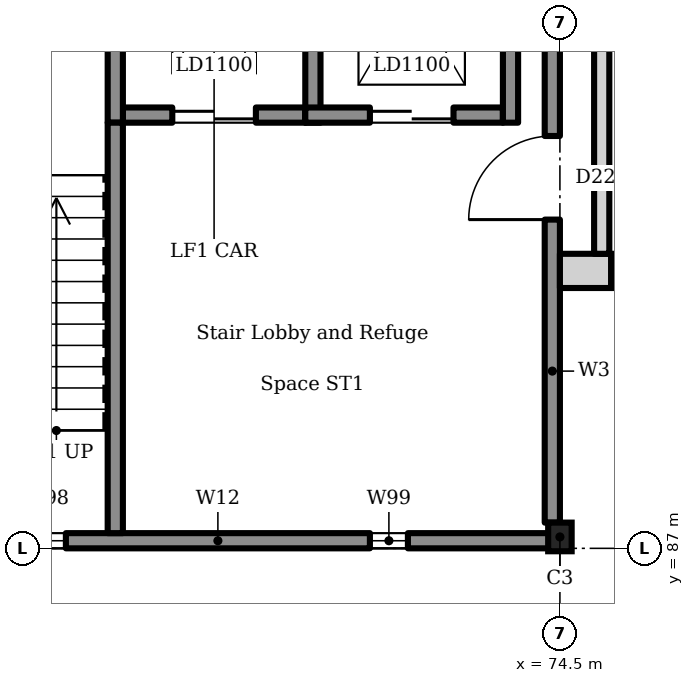
"""IFC4 building model, lengths in metres.
Left out: names, types, materials, properties, quantities, classifications, styles, units other than length and angle.
Written with IfcOpenShell. Run it as: python <this file> out.ifc"""

import sys

from ifc_helpers import new_model, si_unit, direction, frame, frame_2d, origin, origin_2d, place, context, subcontext, project, spatial, rectangle, i_section, extrude, element, fill, save


model = new_model("IFC4")
c1 = context("Model", 3, precision=1e-05, world=origin(), true_north=direction((0.0, 1.0)))
c2 = subcontext(c1, "Body", "Model", "MODEL_VIEW")
j1 = project(units=[si_unit("LENGTHUNIT", "METRE"), si_unit("PLANEANGLEUNIT", "RADIAN")], contexts=[c1])
p1 = place(None, origin())
s1 = spatial("IfcSite", under=j1, at=p1, CompositionType="ELEMENT")
p2 = place(p1, origin())
s2 = spatial("IfcBuilding", under=s1, at=p2, CompositionType="ELEMENT")
p3 = place(p2, frame((0.0, 0.0, 5.4)))
s3 = spatial("IfcBuildingStorey", under=s2, at=p3, CompositionType="ELEMENT", Elevation=5.4)
p4 = place(p3, frame((68.75, 92.7, 0.0), z_axis=(0.0, 0.0, 1.0), x_axis=(1.0, 0.0, 0.0)))
e1 = element("IfcWall", 1, at=p4, inside=s3, PredefinedType="SOLIDWALL", context=c2, shape_type="SweptSolid", body=[
    extrude(rectangle(XDim=2.4, YDim=0.2, at=frame_2d((1.2, 0.0))), origin(), (0.0, 0.0, 1.0), 4.5),
])
p5 = place(p4, frame((0.65, 0.0, 0.0)))
e2 = element("IfcOpeningElement", 2, at=p5, cuts=e1, PredefinedType="OPENING", context=c2, shape_type="SweptSolid", body=[
    extrude(rectangle(XDim=1.1, YDim=2.1, at=frame_2d((0.55, 1.05))), frame((0.0, 0.11, 0.0), z_axis=(0.0, -1.0, 0.0), x_axis=(1.0, 0.0, 0.0)), (0.0, 0.0, 1.0), 0.22),
])
for number, where, z_axis, x_axis in (
    (3, (68.65, 92.6, 0.0), (0.0, 0.0, 1.0), (0.0, 1.0, 0.0)),
    (4, (71.25, 92.6, 0.0), (0.0, 0.0, 1.0), (0.0, 1.0, 0.0)),
):
    element("IfcWall", number, at=place(p3, frame(where, z_axis=z_axis, x_axis=x_axis)), inside=s3, PredefinedType="SOLIDWALL", context=c2, shape_type="SweptSolid", body=[
        extrude(rectangle(XDim=3.4, YDim=0.2, at=frame_2d((1.7, 0.0))), origin(), (0.0, 0.0, 1.0), 4.5),
    ])
p6 = place(p3, frame((71.15, 92.7, 0.0), z_axis=(0.0, 0.0, 1.0), x_axis=(1.0, 0.0, 0.0)))
e5 = element("IfcWall", 5, at=p6, inside=s3, PredefinedType="SOLIDWALL", context=c2, shape_type="SweptSolid", body=[
    extrude(rectangle(XDim=2.6, YDim=0.2, at=frame_2d((1.3, 0.0))), origin(), (0.0, 0.0, 1.0), 4.5),
])
p7 = place(p6, frame((0.85, 0.0, 0.0)))
e6 = element("IfcOpeningElement", 6, at=p7, cuts=e5, PredefinedType="OPENING", context=c2, shape_type="SweptSolid", body=[
    extrude(rectangle(XDim=1.1, YDim=2.1, at=frame_2d((0.55, 1.05))), frame((0.0, 0.11, 0.0), z_axis=(0.0, -1.0, 0.0), x_axis=(1.0, 0.0, 0.0)), (0.0, 0.0, 1.0), 0.22),
])
p8 = place(p3, frame((73.85, 92.6, 0.0), z_axis=(0.0, 0.0, 1.0), x_axis=(0.0, 1.0, 0.0)))
e7 = element("IfcWall", 7, at=p8, inside=s3, PredefinedType="SOLIDWALL", context=c2, shape_type="SweptSolid", body=[
    extrude(rectangle(XDim=3.4, YDim=0.2, at=frame_2d((1.7, 0.0))), origin(), (0.0, 0.0, 1.0), 4.5),
])
p9 = place(p3, frame((74.5, 87.15, 0.0), z_axis=(0.0, 0.0, 1.0), x_axis=(1.0, 0.0, 0.0)))
e8 = element("IfcColumn", 8, at=p9, inside=s3, PredefinedType="COLUMN", context=c2, shape_type="SweptSolid", body=[
    extrude(i_section(OverallWidth=0.309, OverallDepth=0.377, WebThickness=0.021, FlangeThickness=0.04, FilletRadius=0.027, at=origin_2d()), origin(), (0.0, 0.0, 1.0), 4.5),
])
p10 = place(p3, frame((74.5, 90.65, 0.0), z_axis=(0.0, 0.0, 1.0), x_axis=(1.0, 0.0, 0.0)))
e9 = element("IfcWall", 9, at=p10, inside=s3, PredefinedType="SOLIDWALL", context=c2, shape_type="SweptSolid", body=[
    extrude(rectangle(XDim=0.675, YDim=0.45, at=frame_2d((0.337, 0.0))), origin(), (0.0, 0.0, 1.0), 2.3),
])
p11 = place(p3, frame((75.175, 90.65, 0.0), z_axis=(0.0, 0.0, 1.0), x_axis=(1.0, 0.0, 0.0)))
e10 = element("IfcWall", 10, at=p11, inside=s3, PredefinedType="SOLIDWALL", context=c2, shape_type="SweptSolid", body=[
    extrude(rectangle(XDim=8.0, YDim=0.45, at=frame_2d((4.0, 0.0))), origin(), (0.0, 0.0, 1.0), 3.97),
])
p12 = place(p11, frame((1.9, 0.0, 0.8)))
e11 = element("IfcOpeningElement", 11, at=p12, cuts=e10, PredefinedType="OPENING", context=c2, shape_type="SweptSolid", body=[
    extrude(rectangle(XDim=1.2, YDim=1.4, at=frame_2d((0.6, 0.7))), frame((0.0, 0.235, 0.0), z_axis=(0.0, -1.0, 0.0), x_axis=(1.0, 0.0, 0.0)), (0.0, 0.0, 1.0), 0.47),
])
p13 = place(p11, frame((4.9, 0.0, 0.8)))
e12 = element("IfcOpeningElement", 12, at=p13, cuts=e10, PredefinedType="OPENING", context=c2, shape_type="SweptSolid", body=[
    extrude(rectangle(XDim=1.2, YDim=1.4, at=frame_2d((0.6, 0.7))), frame((0.0, 0.235, 0.0), z_axis=(0.0, -1.0, 0.0), x_axis=(1.0, 0.0, 0.0)), (0.0, 0.0, 1.0), 0.47),
])
p14 = place(p3, frame((74.4, 87.338, 0.0), z_axis=(0.0, 0.0, 1.0), x_axis=(0.0, 1.0, 0.0)))
e13 = element("IfcWall", 13, at=p14, inside=s3, PredefinedType="SOLIDWALL", context=c2, shape_type="SweptSolid", body=[
    extrude(rectangle(XDim=8.473, YDim=0.2, at=frame_2d((4.237, 0.0))), origin(), (0.0, 0.0, 1.0), 4.3),
])
p15 = place(p14, frame((3.987, 0.0, 0.0)))
e14 = element("IfcOpeningElement", 14, at=p15, cuts=e13, PredefinedType="OPENING", context=c2, shape_type="SweptSolid", body=[
    extrude(rectangle(XDim=1.1, YDim=2.1, at=frame_2d((0.55, 1.05))), frame((0.0, 0.11, 0.0), z_axis=(0.0, -1.0, 0.0), x_axis=(1.0, 0.0, 0.0)), (0.0, 0.0, 1.0), 0.22),
])
p16 = place(p3, frame((65.511, 87.1, 0.0), z_axis=(0.0, 0.0, 1.0), x_axis=(1.0, 0.0, 0.0)))
e15 = element("IfcWall", 15, at=p16, inside=s3, PredefinedType="SOLIDWALL", context=c2, shape_type="SweptSolid", body=[
    extrude(rectangle(XDim=8.978, YDim=0.2, at=frame_2d((4.489, 0.0))), origin(), (0.0, 0.0, 1.0), 4.3),
])
p17 = place(p16, frame((1.989, 0.0, 2.9)))
e16 = element("IfcOpeningElement", 16, at=p17, cuts=e15, PredefinedType="OPENING", context=c2, shape_type="SweptSolid", body=[
    extrude(rectangle(XDim=0.5, YDim=1.2, at=frame_2d((0.25, 0.6))), frame((0.0, 0.11, 0.0), z_axis=(0.0, -1.0, 0.0), x_axis=(1.0, 0.0, 0.0)), (0.0, 0.0, 1.0), 0.22),
])
p18 = place(p16, frame((6.489, 0.0, 2.9)))
e17 = element("IfcOpeningElement", 17, at=p18, cuts=e15, PredefinedType="OPENING", context=c2, shape_type="SweptSolid", body=[
    extrude(rectangle(XDim=0.5, YDim=1.2, at=frame_2d((0.25, 0.6))), frame((0.0, 0.11, 0.0), z_axis=(0.0, -1.0, 0.0), x_axis=(1.0, 0.0, 0.0)), (0.0, 0.0, 1.0), 0.22),
])
p19 = place(p3, frame((68.65, 87.2, 0.0), z_axis=(0.0, 0.0, 1.0), x_axis=(0.0, 1.0, 0.0)))
e18 = element("IfcWall", 18, at=p19, inside=s3, PredefinedType="SOLIDWALL", context=c2, shape_type="SweptSolid", body=[
    extrude(rectangle(XDim=5.4, YDim=0.2, at=frame_2d((2.7, 0.0))), origin(), (0.0, 0.0, 1.0), 4.3),
])
p20 = place(p3, frame((75.05, 90.875, 0.0), z_axis=(0.0, 0.0, 1.0), x_axis=(0.0, 1.0, 0.0)))
e19 = element("IfcWall", 19, at=p20, inside=s3, PredefinedType="SOLIDWALL", context=c2, shape_type="SweptSolid", body=[
    extrude(rectangle(XDim=4.475, YDim=0.2, at=frame_2d((2.238, 0.0))), origin(), (0.0, 0.0, 1.0), 2.3),
])
p21 = place(p5, origin())
e20 = element("IfcDoor", 20, at=p21, inside=s3, OperationType="SLIDING_TO_LEFT", PredefinedType="DOOR", context=c2, shape_type="SweptSolid", body=[
    extrude(rectangle(XDim=1.1, YDim=2.1, at=frame_2d((0.55, 1.05))), frame((0.0, 0.025, 0.0), z_axis=(0.0, -1.0, 0.0), x_axis=(1.0, 0.0, 0.0)), (0.0, 0.0, 1.0), 0.05),
])
fill(e2, e20)
p22 = place(p7, origin())
e21 = element("IfcDoor", 21, at=p22, inside=s3, OperationType="SLIDING_TO_LEFT", PredefinedType="DOOR", context=c2, shape_type="SweptSolid", body=[
    extrude(rectangle(XDim=1.1, YDim=2.1, at=frame_2d((0.55, 1.05))), frame((0.0, 0.025, 0.0), z_axis=(0.0, -1.0, 0.0), x_axis=(1.0, 0.0, 0.0)), (0.0, 0.0, 1.0), 0.05),
])
fill(e6, e21)
p23 = place(p17, origin())
e22 = element("IfcWindow", 22, at=p23, inside=s3, PartitioningType="SINGLE_PANEL", PredefinedType="WINDOW", context=c2, shape_type="SweptSolid", body=[
    extrude(rectangle(XDim=0.5, YDim=1.2, at=frame_2d((0.25, 0.6))), frame((0.0, 0.03, 0.0), z_axis=(0.0, -1.0, 0.0), x_axis=(1.0, 0.0, 0.0)), (0.0, 0.0, 1.0), 0.06),
])
fill(e16, e22)
p24 = place(p18, origin())
e23 = element("IfcWindow", 23, at=p24, inside=s3, PartitioningType="SINGLE_PANEL", PredefinedType="WINDOW", context=c2, shape_type="SweptSolid", body=[
    extrude(rectangle(XDim=0.5, YDim=1.2, at=frame_2d((0.25, 0.6))), frame((0.0, 0.03, 0.0), z_axis=(0.0, -1.0, 0.0), x_axis=(1.0, 0.0, 0.0)), (0.0, 0.0, 1.0), 0.06),
])
fill(e17, e23)
p25 = place(p15, origin())
e24 = element("IfcDoor", 24, at=p25, inside=s3, OperationType="SINGLE_SWING_RIGHT", PredefinedType="DOOR", context=c2, shape_type="SweptSolid", body=[
    extrude(rectangle(XDim=1.1, YDim=2.1, at=frame_2d((0.55, 1.05))), frame((0.0, 0.025, 0.0), z_axis=(0.0, -1.0, 0.0), x_axis=(1.0, 0.0, 0.0)), (0.0, 0.0, 1.0), 0.05),
])
fill(e14, e24)
save(model, sys.argv[1])
